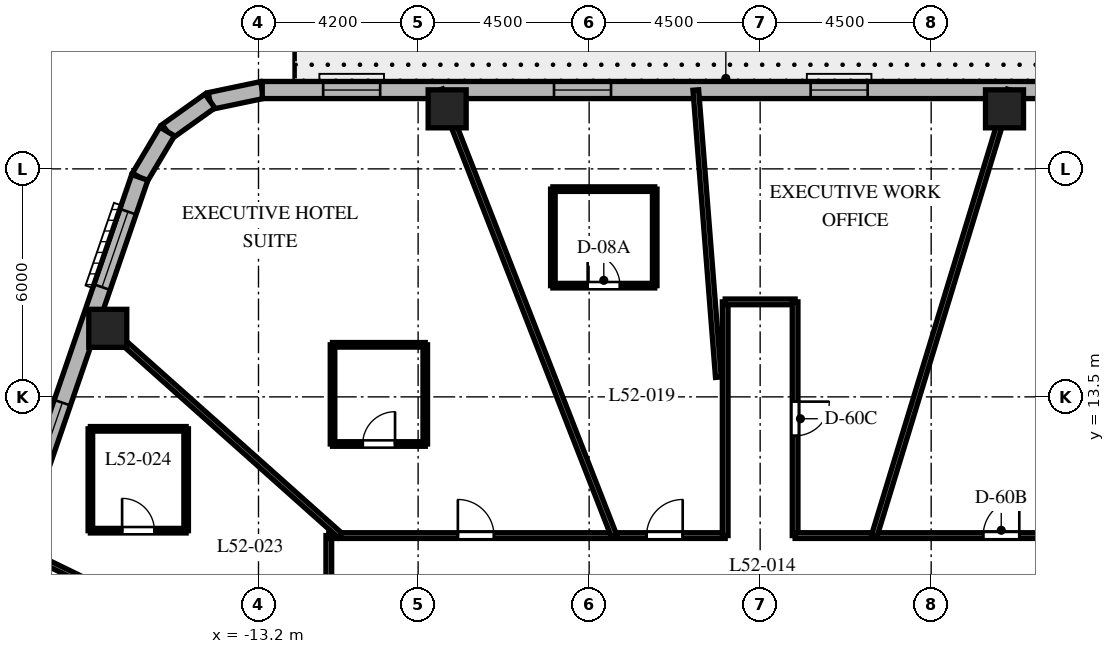
"""IFC4 building model, lengths in metres.
Left out: names, types, materials, properties, quantities, classifications, styles, units other than length and angle.
Written with IfcOpenShell. Run it as: python <this file> out.ifc"""

import sys

from ifc_helpers import new_model, si_unit, direction, frame, frame_2d, origin, origin_2d, place, context, subcontext, project, spatial, rectangle, extrude, element, fill, save


model = new_model("IFC4")
c1 = context("Model", 3, precision=1e-05, world=origin(), true_north=direction((0.0, 1.0)))
c2 = subcontext(c1, "Body", "Model", "MODEL_VIEW")
j1 = project(units=[si_unit("LENGTHUNIT", "METRE"), si_unit("PLANEANGLEUNIT", "RADIAN")], contexts=[c1])
p1 = place(None, origin())
s1 = spatial("IfcSite", under=j1, at=p1, CompositionType="ELEMENT")
p2 = place(p1, origin())
s2 = spatial("IfcBuilding", under=s1, at=p2, CompositionType="ELEMENT")
p3 = place(p2, frame((0.0, 0.0, 210.3)))
s3 = spatial("IfcBuildingStorey", under=s2, at=p3, CompositionType="ELEMENT", Elevation=210.3)
for number, where, z_axis, x_axis in (
    (1, (6.43, 21.08, 0.0), (0.0, 0.0, 1.0), (1.0, 0.0, 0.0)),
    (2, (-8.236, 21.08, 0.0), (0.0, 0.0, 1.0), (1.0, 0.0, 0.0)),
    (3, (-17.166, 15.304, 0.0), (0.0, 0.0, 1.0), (1.0, 0.0, 0.0)),
):
    element("IfcColumn", number, at=place(p3, frame(where, z_axis=z_axis, x_axis=x_axis)), inside=s3, PredefinedType="COLUMN", context=c2, shape_type="SweptSolid", body=[
        extrude(rectangle(XDim=1.0, YDim=1.0, at=origin_2d()), origin(), (0.0, 0.0, 1.0), 3.8),
    ])
p4 = place(p3, frame((-13.102, 21.575, 0.0), z_axis=(0.0, 0.0, 1.0), x_axis=(-0.978757421505, -0.205021730188, 0.0)))
e4 = element("IfcWall", 4, at=p4, inside=s3, PredefinedType="SOLIDWALL", context=c2, shape_type="SweptSolid", body=[
    extrude(rectangle(XDim=1.406, YDim=0.45, at=frame_2d((0.703, 0.0))), origin(), (0.0, 0.0, 1.0), 3.5),
])
p5 = place(p3, frame((-14.478, 21.287, 0.0), z_axis=(0.0, 0.0, 1.0), x_axis=(-0.813888518617, -0.58102106611, 0.0)))
e5 = element("IfcWall", 5, at=p5, inside=s3, PredefinedType="SOLIDWALL", context=c2, shape_type="SweptSolid", body=[
    extrude(rectangle(XDim=1.383, YDim=0.45, at=frame_2d((0.691, 0.0))), origin(), (0.0, 0.0, 1.0), 3.5),
])
p6 = place(p3, frame((-15.604, 20.483, 0.0), z_axis=(0.0, 0.0, 1.0), x_axis=(-0.512222149036, -0.858852996756, 0.0)))
e6 = element("IfcWall", 6, at=p6, inside=s3, PredefinedType="SOLIDWALL", context=c2, shape_type="SweptSolid", body=[
    extrude(rectangle(XDim=1.406, YDim=0.45, at=frame_2d((0.703, 0.0))), origin(), (0.0, 0.0, 1.0), 3.5),
])
p7 = place(p3, frame((11.298, 21.575, 0.0), z_axis=(0.0, 0.0, 1.0), x_axis=(-1.0, 0.0, 0.0)))
e7 = element("IfcWall", 7, at=p7, inside=s3, PredefinedType="SOLIDWALL", context=c2, shape_type="SweptSolid", body=[
    extrude(rectangle(XDim=24.399, YDim=0.45, at=frame_2d((12.2, 0.0))), origin(), (0.0, 0.0, 1.0), 3.5),
])
p8 = place(p7, frame((2.55, 0.0, 0.0)))
e8 = element("IfcOpeningElement", 8, at=p8, cuts=e7, PredefinedType="OPENING", context=c2, shape_type="SweptSolid", body=[
    extrude(rectangle(XDim=0.95, YDim=2.15, at=frame_2d((0.475, 1.075))), frame((0.0, 0.235, 0.0), z_axis=(0.0, -1.0, 0.0), x_axis=(1.0, 0.0, 0.0)), (0.0, 0.0, 1.0), 0.47),
])
p9 = place(p7, frame((8.469, 0.0, 0.8)))
e9 = element("IfcOpeningElement", 9, at=p9, cuts=e7, PredefinedType="OPENING", context=c2, shape_type="SweptSolid", body=[
    extrude(rectangle(XDim=1.5, YDim=1.8, at=frame_2d((0.75, 0.9))), frame((0.0, 0.235, 0.0), z_axis=(0.0, -1.0, 0.0), x_axis=(1.0, 0.0, 0.0)), (0.0, 0.0, 1.0), 0.47),
])
p10 = place(p7, frame((15.222, 0.0, 0.8)))
e10 = element("IfcOpeningElement", 10, at=p10, cuts=e7, PredefinedType="OPENING", context=c2, shape_type="SweptSolid", body=[
    extrude(rectangle(XDim=1.5, YDim=1.8, at=frame_2d((0.75, 0.9))), frame((0.0, 0.235, 0.0), z_axis=(0.0, -1.0, 0.0), x_axis=(1.0, 0.0, 0.0)), (0.0, 0.0, 1.0), 0.47),
])
p11 = place(p7, frame((21.296, 0.0, 0.8)))
e11 = element("IfcOpeningElement", 11, at=p11, cuts=e7, PredefinedType="OPENING", context=c2, shape_type="SweptSolid", body=[
    extrude(rectangle(XDim=1.5, YDim=1.8, at=frame_2d((0.75, 0.9))), frame((0.0, 0.235, 0.0), z_axis=(0.0, -1.0, 0.0), x_axis=(1.0, 0.0, 0.0)), (0.0, 0.0, 1.0), 0.47),
])
p12 = place(p3, frame((-16.324, 19.275, 0.0), z_axis=(0.0, 0.0, 1.0), x_axis=(-0.325083142304, -0.945685439557, 0.0)))
e12 = element("IfcWall", 12, at=p12, inside=s3, PredefinedType="SOLIDWALL", context=c2, shape_type="SweptSolid", body=[
    extrude(rectangle(XDim=20.224, YDim=0.45, at=frame_2d((10.112, 0.0))), origin(), (0.0, 0.0, 1.0), 3.5),
])
p13 = place(p12, frame((0.953, 0.0, 0.8)))
e13 = element("IfcOpeningElement", 13, at=p13, cuts=e12, PredefinedType="OPENING", context=c2, shape_type="SweptSolid", body=[
    extrude(rectangle(XDim=2.1, YDim=1.85, at=frame_2d((1.05, 0.925))), frame((0.0, 0.235, 0.0), z_axis=(0.0, -1.0, 0.0), x_axis=(1.0, 0.0, 0.0)), (0.0, 0.0, 1.0), 0.47),
])
p14 = place(p12, frame((6.268, 0.0, 0.8)))
e14 = element("IfcOpeningElement", 14, at=p14, cuts=e12, PredefinedType="OPENING", context=c2, shape_type="SweptSolid", body=[
    extrude(rectangle(XDim=2.1, YDim=1.85, at=frame_2d((1.05, 0.925))), frame((0.0, 0.235, 0.0), z_axis=(0.0, -1.0, 0.0), x_axis=(1.0, 0.0, 0.0)), (0.0, 0.0, 1.0), 0.47),
])
p15 = place(p12, frame((11.95, 0.0, 0.8)))
e15 = element("IfcOpeningElement", 15, at=p15, cuts=e12, PredefinedType="OPENING", context=c2, shape_type="SweptSolid", body=[
    extrude(rectangle(XDim=2.1, YDim=1.85, at=frame_2d((1.05, 0.925))), frame((0.0, 0.235, 0.0), z_axis=(0.0, -1.0, 0.0), x_axis=(1.0, 0.0, 0.0)), (0.0, 0.0, 1.0), 0.47),
])
p16 = place(p12, frame((17.118, 0.0, 0.8)))
e16 = element("IfcOpeningElement", 16, at=p16, cuts=e12, PredefinedType="OPENING", context=c2, shape_type="SweptSolid", body=[
    extrude(rectangle(XDim=2.1, YDim=1.85, at=frame_2d((1.05, 0.925))), frame((0.0, 0.235, 0.0), z_axis=(0.0, -1.0, 0.0), x_axis=(1.0, 0.0, 0.0)), (0.0, 0.0, 1.0), 0.47),
])
p17 = place(p3, frame((-11.35, 4.4, 0.0), z_axis=(0.0, 0.0, 1.0), x_axis=(0.0, 1.0, 0.0)))
e17 = element("IfcWall", 17, at=p17, inside=s3, PredefinedType="PARTITIONING", context=c2, shape_type="SweptSolid", body=[
    extrude(rectangle(XDim=5.45, YDim=0.15, at=frame_2d((2.725, 0.0))), origin(), (0.0, 0.0, 1.0), 2.99),
])
p18 = place(p17, frame((2.694, 0.0, 0.0)))
e18 = element("IfcOpeningElement", 18, at=p18, cuts=e17, PredefinedType="OPENING", context=c2, shape_type="SweptSolid", body=[
    extrude(rectangle(XDim=0.95, YDim=2.03, at=frame_2d((0.475, 1.015))), frame((0.0, 0.085, 0.0), z_axis=(0.0, -1.0, 0.0), x_axis=(1.0, 0.0, 0.0)), (0.0, 0.0, 1.0), 0.17),
])
p19 = place(p3, frame((-11.35, 9.85, 0.0), z_axis=(0.0, 0.0, 1.0), x_axis=(1.0, 0.0, 0.0)))
e19 = element("IfcWall", 19, at=p19, inside=s3, PredefinedType="PARTITIONING", context=c2, shape_type="SweptSolid", body=[
    extrude(rectangle(XDim=10.43, YDim=0.15, at=frame_2d((5.215, 0.0))), origin(), (0.0, 0.0, 1.0), 2.99),
])
p20 = place(p19, frame((8.362, 0.0, 0.0)))
e20 = element("IfcOpeningElement", 20, at=p20, cuts=e19, PredefinedType="OPENING", context=c2, shape_type="SweptSolid", body=[
    extrude(rectangle(XDim=0.95, YDim=2.03, at=frame_2d((0.475, 1.015))), frame((0.0, 0.085, 0.0), z_axis=(0.0, -1.0, 0.0), x_axis=(1.0, 0.0, 0.0)), (0.0, 0.0, 1.0), 0.17),
])
p21 = place(p19, frame((3.396, 0.0, 0.0)))
e21 = element("IfcOpeningElement", 21, at=p21, cuts=e19, PredefinedType="OPENING", context=c2, shape_type="SweptSolid", body=[
    extrude(rectangle(XDim=0.95, YDim=2.03, at=frame_2d((0.475, 1.015))), frame((0.0, 0.085, 0.0), z_axis=(0.0, -1.0, 0.0), x_axis=(1.0, 0.0, 0.0)), (0.0, 0.0, 1.0), 0.17),
])
p22 = place(p3, frame((-0.92, 9.85, 0.0), z_axis=(0.0, 0.0, 1.0), x_axis=(0.0, 1.0, 0.0)))
e22 = element("IfcWall", 22, at=p22, inside=s3, PredefinedType="PARTITIONING", context=c2, shape_type="SweptSolid", body=[
    extrude(rectangle(XDim=6.15, YDim=0.15, at=frame_2d((3.075, 0.0))), origin(), (0.0, 0.0, 1.0), 3.026),
])
p23 = place(p3, frame((-0.92, 16.0, 0.0), z_axis=(0.0, 0.0, 1.0), x_axis=(1.0, 0.0, 0.0)))
e23 = element("IfcWall", 23, at=p23, inside=s3, PredefinedType="PARTITIONING", context=c2, shape_type="SweptSolid", body=[
    extrude(rectangle(XDim=1.84, YDim=0.15, at=frame_2d((0.92, 0.0))), origin(), (0.0, 0.0, 1.0), 3.5),
])
p24 = place(p3, frame((0.92, 16.0, 0.0), z_axis=(0.0, 0.0, 1.0), x_axis=(0.0, -1.0, 0.0)))
e24 = element("IfcWall", 24, at=p24, inside=s3, PredefinedType="PARTITIONING", context=c2, shape_type="SweptSolid", body=[
    extrude(rectangle(XDim=6.15, YDim=0.15, at=frame_2d((3.075, 0.0))), origin(), (0.0, 0.0, 1.0), 3.026),
])
p25 = place(p24, frame((2.625, 0.0, 0.0)))
e25 = element("IfcOpeningElement", 25, at=p25, cuts=e24, PredefinedType="OPENING", context=c2, shape_type="SweptSolid", body=[
    extrude(rectangle(XDim=0.9, YDim=2.03, at=frame_2d((0.45, 1.015))), frame((0.0, 0.085, 0.0), z_axis=(0.0, -1.0, 0.0), x_axis=(1.0, 0.0, 0.0)), (0.0, 0.0, 1.0), 0.17),
])
p26 = place(p3, frame((0.92, 9.85, 0.0), z_axis=(0.0, 0.0, 1.0), x_axis=(1.0, 0.0, 0.0)))
e26 = element("IfcWall", 26, at=p26, inside=s3, PredefinedType="PARTITIONING", context=c2, shape_type="SweptSolid", body=[
    extrude(rectangle(XDim=10.43, YDim=0.15, at=frame_2d((5.215, 0.0))), origin(), (0.0, 0.0, 1.0), 2.99),
])
p27 = place(p26, frame((4.949, 0.0, 0.0)))
e27 = element("IfcOpeningElement", 27, at=p27, cuts=e26, PredefinedType="OPENING", context=c2, shape_type="SweptSolid", body=[
    extrude(rectangle(XDim=0.95, YDim=2.03, at=frame_2d((0.475, 1.015))), frame((0.0, 0.085, 0.0), z_axis=(0.0, -1.0, 0.0), x_axis=(1.0, 0.0, 0.0)), (0.0, 0.0, 1.0), 0.17),
])
p28 = place(p3, frame((3.004, 9.85, 0.0), z_axis=(0.0, 0.0, 1.0), x_axis=(0.291775760688, 0.956486751333, 0.0)))
e28 = element("IfcWall", 28, at=p28, inside=s3, PredefinedType="PARTITIONING", context=c2, shape_type="SweptSolid", body=[
    extrude(rectangle(XDim=12.258, YDim=0.15, at=frame_2d((6.129, 0.0))), origin(), (0.0, 0.0, 1.0), 2.74),
])
p29 = place(p3, frame((-1.1, 14.018, 0.0), z_axis=(0.0, 0.0, 1.0), x_axis=(-0.078228275349, 0.996935472804, 0.0)))
e29 = element("IfcWall", 29, at=p29, inside=s3, PredefinedType="PARTITIONING", context=c2, shape_type="SweptSolid", body=[
    extrude(rectangle(XDim=7.581, YDim=0.15, at=frame_2d((3.79, 0.0))), origin(), (0.0, 0.0, 1.0), 2.74),
])
p30 = place(p3, frame((-3.848, 9.85, 0.0), z_axis=(0.0, 0.0, 1.0), x_axis=(-0.363921778212, 0.931429513889, 0.0)))
e30 = element("IfcWall", 30, at=p30, inside=s3, PredefinedType="PARTITIONING", context=c2, shape_type="SweptSolid", body=[
    extrude(rectangle(XDim=12.588, YDim=0.15, at=frame_2d((6.294, 0.0))), origin(), (0.0, 0.0, 1.0), 2.74),
])
p31 = place(p3, frame((-11.048, 9.85, 0.0), z_axis=(0.0, 0.0, 1.0), x_axis=(-0.746444434655, 0.665447748492, 0.0)))
e31 = element("IfcWall", 31, at=p31, inside=s3, PredefinedType="PARTITIONING", context=c2, shape_type="SweptSolid", body=[
    extrude(rectangle(XDim=8.732, YDim=0.15, at=frame_2d((4.366, 0.0))), origin(), (0.0, 0.0, 1.0), 2.74),
])
p32 = place(p3, frame((-11.35, 5.528, 0.0), z_axis=(0.0, 0.0, 1.0), x_axis=(-0.899038669565, 0.437869239188, 0.0)))
e32 = element("IfcWall", 32, at=p32, inside=s3, PredefinedType="PARTITIONING", context=c2, shape_type="SweptSolid", body=[
    extrude(rectangle(XDim=9.242, YDim=0.15, at=frame_2d((4.621, 0.0))), origin(), (0.0, 0.0, 1.0), 2.74),
])
p33 = place(p3, frame((-5.454, 16.427, 0.0), z_axis=(0.0, 0.0, 1.0), x_axis=(1.0, 0.0, 0.0)))
e33 = element("IfcWall", 33, at=p33, inside=s3, PredefinedType="PARTITIONING", context=c2, shape_type="SweptSolid", body=[
    extrude(rectangle(XDim=2.68, YDim=0.12, at=frame_2d((1.34, 0.0))), origin(), (0.0, 0.0, 1.0), 3.5),
])
p34 = place(p33, frame((0.915, 0.0, 0.0)))
e34 = element("IfcOpeningElement", 34, at=p34, cuts=e33, PredefinedType="OPENING", context=c2, shape_type="SweptSolid", body=[
    extrude(rectangle(XDim=0.85, YDim=2.03, at=frame_2d((0.425, 1.015))), frame((0.0, 0.07, 0.0), z_axis=(0.0, -1.0, 0.0), x_axis=(1.0, 0.0, 0.0)), (0.0, 0.0, 1.0), 0.14),
])
p35 = place(p3, frame((-2.774, 16.427, 0.0), z_axis=(0.0, 0.0, 1.0), x_axis=(0.0, 1.0, 0.0)))
e35 = element("IfcWall", 35, at=p35, inside=s3, PredefinedType="PARTITIONING", context=c2, shape_type="SweptSolid", body=[
    extrude(rectangle(XDim=2.54, YDim=0.12, at=frame_2d((1.27, 0.0))), origin(), (0.0, 0.0, 1.0), 2.94),
])
p36 = place(p3, frame((-2.774, 18.967, 0.0), z_axis=(0.0, 0.0, 1.0), x_axis=(-1.0, 0.0, 0.0)))
e36 = element("IfcWall", 36, at=p36, inside=s3, PredefinedType="PARTITIONING", context=c2, shape_type="SweptSolid", body=[
    extrude(rectangle(XDim=2.68, YDim=0.12, at=frame_2d((1.34, 0.0))), origin(), (0.0, 0.0, 1.0), 3.5),
])
p37 = place(p3, frame((-5.454, 18.967, 0.0), z_axis=(0.0, 0.0, 1.0), x_axis=(0.0, -1.0, 0.0)))
e37 = element("IfcWall", 37, at=p37, inside=s3, PredefinedType="PARTITIONING", context=c2, shape_type="SweptSolid", body=[
    extrude(rectangle(XDim=2.54, YDim=0.12, at=frame_2d((1.27, 0.0))), origin(), (0.0, 0.0, 1.0), 2.94),
])
p38 = place(p3, frame((-11.252, 12.26, 0.0), z_axis=(0.0, 0.0, 1.0), x_axis=(1.0, 0.0, 0.0)))
e38 = element("IfcWall", 38, at=p38, inside=s3, PredefinedType="PARTITIONING", context=c2, shape_type="SweptSolid", body=[
    extrude(rectangle(XDim=2.44, YDim=0.12, at=frame_2d((1.22, 0.0))), origin(), (0.0, 0.0, 1.0), 3.072),
])
p39 = place(p38, frame((0.795, 0.0, 0.0)))
e39 = element("IfcOpeningElement", 39, at=p39, cuts=e38, PredefinedType="OPENING", context=c2, shape_type="SweptSolid", body=[
    extrude(rectangle(XDim=0.85, YDim=2.03, at=frame_2d((0.425, 1.015))), frame((0.0, 0.07, 0.0), z_axis=(0.0, -1.0, 0.0), x_axis=(1.0, 0.0, 0.0)), (0.0, 0.0, 1.0), 0.14),
])
p40 = place(p3, frame((-8.812, 12.26, 0.0), z_axis=(0.0, 0.0, 1.0), x_axis=(0.0, 1.0, 0.0)))
e40 = element("IfcWall", 40, at=p40, inside=s3, PredefinedType="PARTITIONING", context=c2, shape_type="SweptSolid", body=[
    extrude(rectangle(XDim=2.61, YDim=0.12, at=frame_2d((1.305, 0.0))), origin(), (0.0, 0.0, 1.0), 2.99),
])
p41 = place(p3, frame((-8.812, 14.87, 0.0), z_axis=(0.0, 0.0, 1.0), x_axis=(-1.0, 0.0, 0.0)))
e41 = element("IfcWall", 41, at=p41, inside=s3, PredefinedType="PARTITIONING", context=c2, shape_type="SweptSolid", body=[
    extrude(rectangle(XDim=2.44, YDim=0.12, at=frame_2d((1.22, 0.0))), origin(), (0.0, 0.0, 1.0), 3.026),
])
p42 = place(p3, frame((-11.252, 14.87, 0.0), z_axis=(0.0, 0.0, 1.0), x_axis=(0.0, -1.0, 0.0)))
e42 = element("IfcWall", 42, at=p42, inside=s3, PredefinedType="PARTITIONING", context=c2, shape_type="SweptSolid", body=[
    extrude(rectangle(XDim=2.61, YDim=0.12, at=frame_2d((1.305, 0.0))), origin(), (0.0, 0.0, 1.0), 3.026),
])
p43 = place(p3, frame((-17.624, 9.979, 0.0), z_axis=(0.0, 0.0, 1.0), x_axis=(1.0, 0.0, 0.0)))
e43 = element("IfcWall", 43, at=p43, inside=s3, PredefinedType="PARTITIONING", context=c2, shape_type="SweptSolid", body=[
    extrude(rectangle(XDim=2.52, YDim=0.12, at=frame_2d((1.26, 0.0))), origin(), (0.0, 0.0, 1.0), 3.072),
])
p44 = place(p43, frame((0.835, 0.0, 0.0)))
e44 = element("IfcOpeningElement", 44, at=p44, cuts=e43, PredefinedType="OPENING", context=c2, shape_type="SweptSolid", body=[
    extrude(rectangle(XDim=0.85, YDim=2.03, at=frame_2d((0.425, 1.015))), frame((0.0, 0.07, 0.0), z_axis=(0.0, -1.0, 0.0), x_axis=(1.0, 0.0, 0.0)), (0.0, 0.0, 1.0), 0.14),
])
p45 = place(p3, frame((-15.104, 9.979, 0.0), z_axis=(0.0, 0.0, 1.0), x_axis=(0.0, 1.0, 0.0)))
e45 = element("IfcWall", 45, at=p45, inside=s3, PredefinedType="PARTITIONING", context=c2, shape_type="SweptSolid", body=[
    extrude(rectangle(XDim=2.68, YDim=0.12, at=frame_2d((1.34, 0.0))), origin(), (0.0, 0.0, 1.0), 3.072),
])
p46 = place(p3, frame((-15.104, 12.659, 0.0), z_axis=(0.0, 0.0, 1.0), x_axis=(-1.0, 0.0, 0.0)))
e46 = element("IfcWall", 46, at=p46, inside=s3, PredefinedType="PARTITIONING", context=c2, shape_type="SweptSolid", body=[
    extrude(rectangle(XDim=2.52, YDim=0.12, at=frame_2d((1.26, 0.0))), origin(), (0.0, 0.0, 1.0), 3.5),
])
p47 = place(p3, frame((-17.624, 12.659, 0.0), z_axis=(0.0, 0.0, 1.0), x_axis=(0.0, -1.0, 0.0)))
e47 = element("IfcWall", 47, at=p47, inside=s3, PredefinedType="PARTITIONING", context=c2, shape_type="SweptSolid", body=[
    extrude(rectangle(XDim=2.68, YDim=0.12, at=frame_2d((1.34, 0.0))), origin(), (0.0, 0.0, 1.0), 3.5),
])
p48 = place(p9, origin())
e48 = element("IfcWindow", 48, at=p48, inside=s3, PartitioningType="SINGLE_PANEL", PredefinedType="WINDOW", context=c2, shape_type="SweptSolid", body=[
    extrude(rectangle(XDim=1.5, YDim=1.8, at=frame_2d((0.75, 0.9))), frame((0.0, 0.03, 0.0), z_axis=(0.0, -1.0, 0.0), x_axis=(1.0, 0.0, 0.0)), (0.0, 0.0, 1.0), 0.06),
])
fill(e9, e48)
p49 = place(p10, origin())
e49 = element("IfcWindow", 49, at=p49, inside=s3, PartitioningType="SINGLE_PANEL", PredefinedType="WINDOW", context=c2, shape_type="SweptSolid", body=[
    extrude(rectangle(XDim=1.5, YDim=1.8, at=frame_2d((0.75, 0.9))), frame((0.0, 0.03, 0.0), z_axis=(0.0, -1.0, 0.0), x_axis=(1.0, 0.0, 0.0)), (0.0, 0.0, 1.0), 0.06),
])
fill(e10, e49)
p50 = place(p11, origin())
e50 = element("IfcWindow", 50, at=p50, inside=s3, PartitioningType="SINGLE_PANEL", PredefinedType="WINDOW", context=c2, shape_type="SweptSolid", body=[
    extrude(rectangle(XDim=1.5, YDim=1.8, at=frame_2d((0.75, 0.9))), frame((0.0, 0.03, 0.0), z_axis=(0.0, -1.0, 0.0), x_axis=(1.0, 0.0, 0.0)), (0.0, 0.0, 1.0), 0.06),
])
fill(e11, e50)
p51 = place(p13, origin())
e51 = element("IfcWindow", 51, at=p51, inside=s3, PartitioningType="SINGLE_PANEL", PredefinedType="WINDOW", context=c2, shape_type="SweptSolid", body=[
    extrude(rectangle(XDim=2.1, YDim=1.85, at=frame_2d((1.05, 0.925))), frame((0.0, 0.03, 0.0), z_axis=(0.0, -1.0, 0.0), x_axis=(1.0, 0.0, 0.0)), (0.0, 0.0, 1.0), 0.06),
])
fill(e13, e51)
p52 = place(p14, origin())
e52 = element("IfcWindow", 52, at=p52, inside=s3, PartitioningType="SINGLE_PANEL", PredefinedType="WINDOW", context=c2, shape_type="SweptSolid", body=[
    extrude(rectangle(XDim=2.1, YDim=1.85, at=frame_2d((1.05, 0.925))), frame((0.0, 0.03, 0.0), z_axis=(0.0, -1.0, 0.0), x_axis=(1.0, 0.0, 0.0)), (0.0, 0.0, 1.0), 0.06),
])
fill(e14, e52)
p53 = place(p27, origin())
e53 = element("IfcDoor", 53, at=p53, inside=s3, OperationType="SINGLE_SWING_RIGHT", PredefinedType="DOOR", context=c2, shape_type="SweptSolid", body=[
    extrude(rectangle(XDim=0.95, YDim=2.03, at=frame_2d((0.475, 1.015))), frame((0.0, 0.025, 0.0), z_axis=(0.0, -1.0, 0.0), x_axis=(1.0, 0.0, 0.0)), (0.0, 0.0, 1.0), 0.05),
])
fill(e27, e53)
p54 = place(p25, origin())
e54 = element("IfcDoor", 54, at=p54, inside=s3, OperationType="SINGLE_SWING_LEFT", PredefinedType="DOOR", context=c2, shape_type="SweptSolid", body=[
    extrude(rectangle(XDim=0.9, YDim=2.03, at=frame_2d((0.45, 1.015))), frame((0.0, 0.025, 0.0), z_axis=(0.0, -1.0, 0.0), x_axis=(1.0, 0.0, 0.0)), (0.0, 0.0, 1.0), 0.05),
])
fill(e25, e54)
p55 = place(p20, origin())
e55 = element("IfcDoor", 55, at=p55, inside=s3, OperationType="SINGLE_SWING_RIGHT", PredefinedType="DOOR", context=c2, shape_type="SweptSolid", body=[
    extrude(rectangle(XDim=0.95, YDim=2.03, at=frame_2d((0.475, 1.015))), frame((0.0, 0.025, 0.0), z_axis=(0.0, -1.0, 0.0), x_axis=(1.0, 0.0, 0.0)), (0.0, 0.0, 1.0), 0.05),
])
fill(e20, e55)
p56 = place(p34, origin())
e56 = element("IfcDoor", 56, at=p56, inside=s3, OperationType="SINGLE_SWING_LEFT", PredefinedType="DOOR", context=c2, shape_type="SweptSolid", body=[
    extrude(rectangle(XDim=0.85, YDim=2.03, at=frame_2d((0.425, 1.015))), frame((0.0, 0.025, 0.0), z_axis=(0.0, -1.0, 0.0), x_axis=(1.0, 0.0, 0.0)), (0.0, 0.0, 1.0), 0.05),
])
fill(e34, e56)
p57 = place(p21, origin())
e57 = element("IfcDoor", 57, at=p57, inside=s3, OperationType="SINGLE_SWING_LEFT", PredefinedType="DOOR", context=c2, shape_type="SweptSolid", body=[
    extrude(rectangle(XDim=0.95, YDim=2.03, at=frame_2d((0.475, 1.015))), frame((0.0, 0.025, 0.0), z_axis=(0.0, -1.0, 0.0), x_axis=(1.0, 0.0, 0.0)), (0.0, 0.0, 1.0), 0.05),
])
fill(e21, e57)
p58 = place(p39, origin())
e58 = element("IfcDoor", 58, at=p58, inside=s3, OperationType="SINGLE_SWING_RIGHT", PredefinedType="DOOR", context=c2, shape_type="SweptSolid", body=[
    extrude(rectangle(XDim=0.85, YDim=2.03, at=frame_2d((0.425, 1.015))), frame((0.0, 0.025, 0.0), z_axis=(0.0, -1.0, 0.0), x_axis=(1.0, 0.0, 0.0)), (0.0, 0.0, 1.0), 0.05),
])
fill(e39, e58)
p59 = place(p44, origin())
e59 = element("IfcDoor", 59, at=p59, inside=s3, OperationType="SINGLE_SWING_LEFT", PredefinedType="DOOR", context=c2, shape_type="SweptSolid", body=[
    extrude(rectangle(XDim=0.85, YDim=2.03, at=frame_2d((0.425, 1.015))), frame((0.0, 0.025, 0.0), z_axis=(0.0, -1.0, 0.0), x_axis=(1.0, 0.0, 0.0)), (0.0, 0.0, 1.0), 0.05),
])
fill(e44, e59)
save(model, sys.argv[1])
